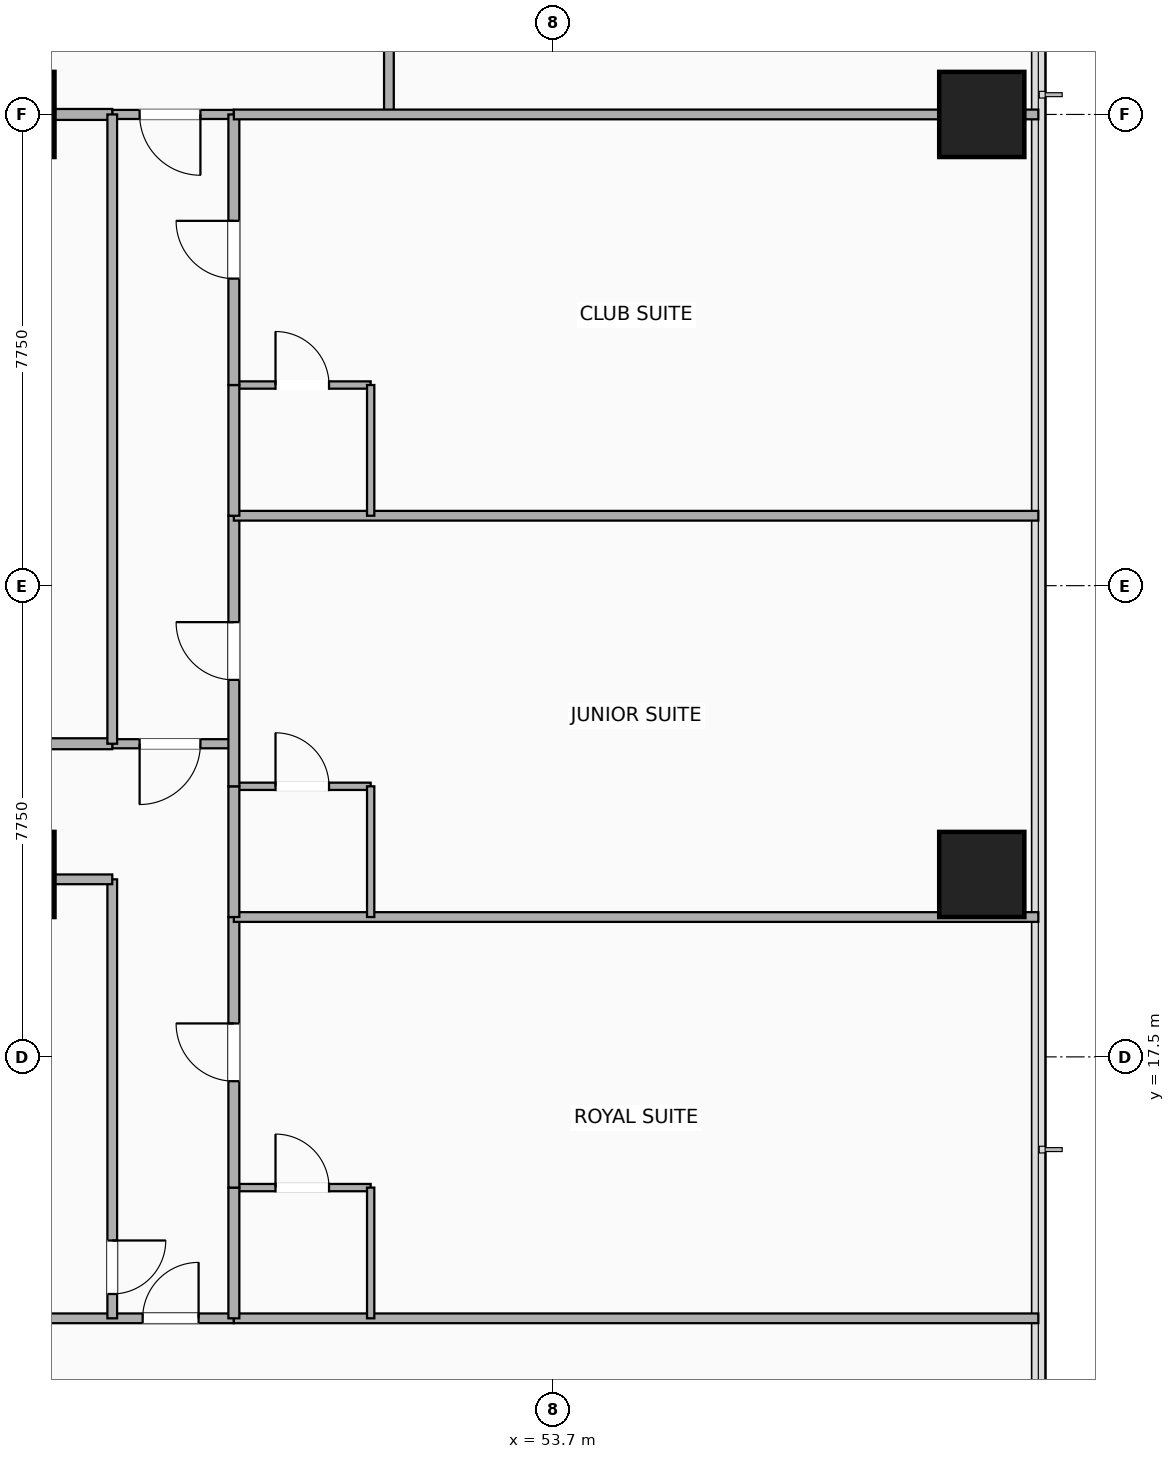
"""IFC4 building model, lengths in metres.
Left out: names, types, materials, properties, quantities, classifications, styles, units other than length and angle.
Written with IfcOpenShell. Run it as: python <this file> out.ifc"""

import sys

from ifc_helpers import new_model, si_unit, direction, frame, frame_2d, origin, origin_2d, place, context, subcontext, project, spatial, rectangle, extrude, element, fill, save


model = new_model("IFC4")
c1 = context("Model", 3, precision=1e-05, world=origin(), true_north=direction((0.0, 1.0)))
c2 = subcontext(c1, "Body", "Model", "MODEL_VIEW")
j1 = project(units=[si_unit("LENGTHUNIT", "METRE"), si_unit("PLANEANGLEUNIT", "RADIAN")], contexts=[c1])
p1 = place(None, origin())
s1 = spatial("IfcSite", under=j1, at=p1, CompositionType="ELEMENT")
p2 = place(p1, origin())
s2 = spatial("IfcBuilding", under=s1, at=p2, CompositionType="ELEMENT")
p3 = place(p2, frame((0.0, 0.0, 68.4)))
s3 = spatial("IfcBuildingStorey", under=s2, at=p3, CompositionType="ELEMENT", Elevation=68.4)
for number, where, z_axis, x_axis in (
    (1, (44.8, 20.5, -0.28), (0.0, 0.0, 1.0), (1.0, 0.0, 0.0)),
    (2, (44.8, 33.0, -0.28), (0.0, 0.0, 1.0), (1.0, 0.0, 0.0)),
    (3, (60.75, 20.5, -0.28), (0.0, 0.0, 1.0), (1.0, 0.0, 0.0)),
    (4, (60.75, 33.0, -0.28), (0.0, 0.0, 1.0), (1.0, 0.0, 0.0)),
):
    element("IfcColumn", number, at=place(p3, frame(where, z_axis=z_axis, x_axis=x_axis)), inside=s3, PredefinedType="COLUMN", context=c2, shape_type="SweptSolid", body=[
        extrude(rectangle(XDim=1.4, YDim=1.4, at=origin_2d()), origin(), (0.0, 0.0, 1.0), 3.5),
    ])
p4 = place(p3, frame((44.8, 13.2, 0.0), z_axis=(0.0, 0.0, 1.0), x_axis=(1.0, 0.0, 0.0)))
e5 = element("IfcWall", 5, at=p4, inside=s3, PredefinedType="PARTITIONING", context=c2, shape_type="SweptSolid", body=[
    extrude(rectangle(XDim=3.65, YDim=0.16, at=frame_2d((1.825, 0.0))), origin(), (0.0, 0.0, 1.0), 2.51),
])
p5 = place(p4, frame((3.07, 0.0, 0.0), z_axis=(0.0, 0.0, 1.0), x_axis=(-1.0, 0.0, 0.0)))
e6 = element("IfcOpeningElement", 6, at=p5, cuts=e5, PredefinedType="OPENING", context=c2, shape_type="SweptSolid", body=[
    extrude(rectangle(XDim=0.92, YDim=2.08, at=frame_2d((0.46, 1.04))), frame((0.0, 0.09, 0.0), z_axis=(0.0, -1.0, 0.0), x_axis=(1.0, 0.0, 0.0)), (0.0, 0.0, 1.0), 0.18),
])
p6 = place(p3, frame((46.45, 13.2, 0.0), z_axis=(0.0, 0.0, 1.0), x_axis=(0.0, 1.0, 0.0)))
e7 = element("IfcWall", 7, at=p6, inside=s3, PredefinedType="PARTITIONING", context=c2, shape_type="SweptSolid", body=[
    extrude(rectangle(XDim=7.22, YDim=0.16, at=frame_2d((3.61, 0.0))), origin(), (0.0, 0.0, 1.0), 2.51),
])
p7 = place(p6, frame((0.4, 0.0, 0.0)))
e8 = element("IfcOpeningElement", 8, at=p7, cuts=e7, PredefinedType="OPENING", context=c2, shape_type="SweptSolid", body=[
    extrude(rectangle(XDim=0.88, YDim=2.08, at=frame_2d((0.44, 1.04))), frame((0.0, 0.09, 0.0), z_axis=(0.0, -1.0, 0.0), x_axis=(1.0, 0.0, 0.0)), (0.0, 0.0, 1.0), 0.18),
])
p8 = place(p3, frame((44.8, 20.42, 0.0), z_axis=(0.0, 0.0, 1.0), x_axis=(1.0, 0.0, 0.0)))
e9 = element("IfcWall", 9, at=p8, inside=s3, PredefinedType="PARTITIONING", context=c2, shape_type="SweptSolid", body=[
    extrude(rectangle(XDim=1.65, YDim=0.16, at=frame_2d((0.825, 0.0))), origin(), (0.0, 0.0, 1.0), 2.51),
])
p9 = place(p3, frame((46.45, 22.65, 0.0), z_axis=(0.0, 0.0, 1.0), x_axis=(1.0, 0.0, 0.0)))
e10 = element("IfcWall", 10, at=p9, inside=s3, PredefinedType="PARTITIONING", context=c2, shape_type="SweptSolid", body=[
    extrude(rectangle(XDim=2.0, YDim=0.15, at=frame_2d((1.0, 0.0))), origin(), (0.0, 0.0, 1.0), 3.22),
])
p10 = place(p9, frame((0.45, 0.0, 0.0)))
e11 = element("IfcOpeningElement", 11, at=p10, cuts=e10, PredefinedType="OPENING", context=c2, shape_type="SweptSolid", body=[
    extrude(rectangle(XDim=1.0, YDim=2.15, at=frame_2d((0.5, 1.075))), frame((0.0, 0.085, 0.0), z_axis=(0.0, -1.0, 0.0), x_axis=(1.0, 0.0, 0.0)), (0.0, 0.0, 1.0), 0.17),
])
p11 = place(p3, frame((46.45, 33.0, 0.0), z_axis=(0.0, 0.0, 1.0), x_axis=(1.0, 0.0, 0.0)))
e12 = element("IfcWall", 12, at=p11, inside=s3, PredefinedType="PARTITIONING", context=c2, shape_type="SweptSolid", body=[
    extrude(rectangle(XDim=2.0, YDim=0.15, at=frame_2d((1.0, 0.0))), origin(), (0.0, 0.0, 1.0), 2.51),
])
p12 = place(p11, frame((0.45, 0.0, 0.0)))
e13 = element("IfcOpeningElement", 13, at=p12, cuts=e12, PredefinedType="OPENING", context=c2, shape_type="SweptSolid", body=[
    extrude(rectangle(XDim=1.0, YDim=2.15, at=frame_2d((0.5, 1.075))), frame((0.0, 0.085, 0.0), z_axis=(0.0, -1.0, 0.0), x_axis=(1.0, 0.0, 0.0)), (0.0, 0.0, 1.0), 0.17),
])
p13 = place(p3, frame((51.0, 33.0, 0.0), z_axis=(0.0, 0.0, 1.0), x_axis=(0.0, 1.0, 0.0)))
e14 = element("IfcWall", 14, at=p13, inside=s3, PredefinedType="PARTITIONING", context=c2, shape_type="SweptSolid", body=[
    extrude(rectangle(XDim=2.05, YDim=0.16, at=frame_2d((1.025, 0.0))), origin(), (0.0, 0.0, 1.0), 2.51),
])
p14 = place(p3, frame((24.1, 22.65, 0.0), z_axis=(0.0, 0.0, 1.0), x_axis=(1.0, 0.0, 0.0)))
e15 = element("IfcWall", 15, at=p14, inside=s3, PredefinedType="PARTITIONING", context=c2, shape_type="SweptSolid", body=[
    extrude(rectangle(XDim=22.35, YDim=0.18, at=frame_2d((11.175, 0.0))), origin(), (0.0, 0.0, 1.0), 2.51),
])
p15 = place(p14, frame((10.7, 0.0, 0.0)))
e16 = element("IfcOpeningElement", 16, at=p15, cuts=e15, PredefinedType="OPENING", context=c2, shape_type="SweptSolid", body=[
    extrude(rectangle(XDim=0.95, YDim=2.15, at=frame_2d((0.475, 1.075))), frame((0.0, 0.1, 0.0), z_axis=(0.0, -1.0, 0.0), x_axis=(1.0, 0.0, 0.0)), (0.0, 0.0, 1.0), 0.2),
])
p16 = place(p3, frame((24.1, 33.0, 0.0), z_axis=(0.0, 0.0, 1.0), x_axis=(1.0, 0.0, 0.0)))
e17 = element("IfcWall", 17, at=p16, inside=s3, PredefinedType="PARTITIONING", context=c2, shape_type="SweptSolid", body=[
    extrude(rectangle(XDim=22.35, YDim=0.18, at=frame_2d((11.175, 0.0))), origin(), (0.0, 0.0, 1.0), 2.51),
])
p17 = place(p3, frame((46.45, 22.65, 0.0), z_axis=(0.0, 0.0, 1.0), x_axis=(0.0, 1.0, 0.0)))
e18 = element("IfcWall", 18, at=p17, inside=s3, PredefinedType="PARTITIONING", context=c2, shape_type="SweptSolid", body=[
    extrude(rectangle(XDim=10.35, YDim=0.16, at=frame_2d((5.175, 0.0))), origin(), (0.0, 0.0, 1.0), 2.51),
])
p18 = place(p3, frame((48.45, 13.2, 0.0), z_axis=(0.0, 0.0, 1.0), x_axis=(1.0, 0.0, 0.0)))
e19 = element("IfcWall", 19, at=p18, inside=s3, PredefinedType="PARTITIONING", context=c2, shape_type="SweptSolid", body=[
    extrude(rectangle(XDim=13.23, YDim=0.16, at=frame_2d((6.615, 0.0))), origin(), (0.0, 0.0, 1.0), 2.583),
])
p19 = place(p3, frame((48.45, 15.35, 0.0), z_axis=(0.0, 0.0, 1.0), x_axis=(1.0, 0.0, 0.0)))
e20 = element("IfcWall", 20, at=p19, inside=s3, PredefinedType="PARTITIONING", context=c2, shape_type="SweptSolid", body=[
    extrude(rectangle(XDim=2.25, YDim=0.12, at=frame_2d((1.125, 0.0))), origin(), (0.0, 0.0, 1.0), 3.22),
])
p20 = place(p19, frame((1.565, 0.0, 0.0), z_axis=(0.0, 0.0, 1.0), x_axis=(-1.0, 0.0, 0.0)))
e21 = element("IfcOpeningElement", 21, at=p20, cuts=e20, PredefinedType="OPENING", context=c2, shape_type="SweptSolid", body=[
    extrude(rectangle(XDim=0.88, YDim=2.08, at=frame_2d((0.44, 1.04))), frame((0.0, 0.07, 0.0), z_axis=(0.0, -1.0, 0.0), x_axis=(1.0, 0.0, 0.0)), (0.0, 0.0, 1.0), 0.14),
])
p21 = place(p3, frame((50.7, 13.2, 0.0), z_axis=(0.0, 0.0, 1.0), x_axis=(0.0, 1.0, 0.0)))
e22 = element("IfcWall", 22, at=p21, inside=s3, PredefinedType="PARTITIONING", context=c2, shape_type="SweptSolid", body=[
    extrude(rectangle(XDim=2.15, YDim=0.12, at=frame_2d((1.075, 0.0))), origin(), (0.0, 0.0, 1.0), 2.902),
])
p22 = place(p3, frame((48.45, 13.2, 0.0), z_axis=(0.0, 0.0, 1.0), x_axis=(0.0, 1.0, 0.0)))
e23 = element("IfcWall", 23, at=p22, inside=s3, PredefinedType="PARTITIONING", context=c2, shape_type="SweptSolid", body=[
    extrude(rectangle(XDim=2.15, YDim=0.18, at=frame_2d((1.075, 0.0))), origin(), (0.0, 0.0, 1.0), 2.902),
])
p23 = place(p3, frame((48.45, 15.35, 0.0), z_axis=(0.0, 0.0, 1.0), x_axis=(0.0, 1.0, 0.0)))
e24 = element("IfcWall", 24, at=p23, inside=s3, PredefinedType="PARTITIONING", context=c2, shape_type="SweptSolid", body=[
    extrude(rectangle(XDim=4.45, YDim=0.18, at=frame_2d((2.225, 0.0))), origin(), (0.0, 0.0, 1.0), 2.902),
])
p24 = place(p23, frame((2.7, 0.0, 0.0), z_axis=(0.0, 0.0, 1.0), x_axis=(-1.0, 0.0, 0.0)))
e25 = element("IfcOpeningElement", 25, at=p24, cuts=e24, PredefinedType="OPENING", context=c2, shape_type="SweptSolid", body=[
    extrude(rectangle(XDim=0.95, YDim=2.15, at=frame_2d((0.475, 1.075))), frame((0.0, 0.1, 0.0), z_axis=(0.0, -1.0, 0.0), x_axis=(1.0, 0.0, 0.0)), (0.0, 0.0, 1.0), 0.2),
])
p25 = place(p3, frame((48.45, 19.8, 0.0), z_axis=(0.0, 0.0, 1.0), x_axis=(1.0, 0.0, 0.0)))
e26 = element("IfcWall", 26, at=p25, inside=s3, PredefinedType="PARTITIONING", context=c2, shape_type="SweptSolid", body=[
    extrude(rectangle(XDim=13.23, YDim=0.16, at=frame_2d((6.615, 0.0))), origin(), (0.0, 0.0, 1.0), 2.583),
])
p26 = place(p3, frame((48.45, 21.95, 0.0), z_axis=(0.0, 0.0, 1.0), x_axis=(1.0, 0.0, 0.0)))
e27 = element("IfcWall", 27, at=p26, inside=s3, PredefinedType="PARTITIONING", context=c2, shape_type="SweptSolid", body=[
    extrude(rectangle(XDim=2.25, YDim=0.12, at=frame_2d((1.125, 0.0))), origin(), (0.0, 0.0, 1.0), 3.22),
])
p27 = place(p26, frame((1.565, 0.0, 0.0), z_axis=(0.0, 0.0, 1.0), x_axis=(-1.0, 0.0, 0.0)))
e28 = element("IfcOpeningElement", 28, at=p27, cuts=e27, PredefinedType="OPENING", context=c2, shape_type="SweptSolid", body=[
    extrude(rectangle(XDim=0.88, YDim=2.08, at=frame_2d((0.44, 1.04))), frame((0.0, 0.07, 0.0), z_axis=(0.0, -1.0, 0.0), x_axis=(1.0, 0.0, 0.0)), (0.0, 0.0, 1.0), 0.14),
])
p28 = place(p3, frame((50.7, 19.8, 0.0), z_axis=(0.0, 0.0, 1.0), x_axis=(0.0, 1.0, 0.0)))
e29 = element("IfcWall", 29, at=p28, inside=s3, PredefinedType="PARTITIONING", context=c2, shape_type="SweptSolid", body=[
    extrude(rectangle(XDim=2.15, YDim=0.12, at=frame_2d((1.075, 0.0))), origin(), (0.0, 0.0, 1.0), 2.51),
])
p29 = place(p3, frame((48.45, 19.8, 0.0), z_axis=(0.0, 0.0, 1.0), x_axis=(0.0, 1.0, 0.0)))
e30 = element("IfcWall", 30, at=p29, inside=s3, PredefinedType="PARTITIONING", context=c2, shape_type="SweptSolid", body=[
    extrude(rectangle(XDim=2.15, YDim=0.18, at=frame_2d((1.075, 0.0))), origin(), (0.0, 0.0, 1.0), 2.51),
])
p30 = place(p3, frame((48.45, 21.95, 0.0), z_axis=(0.0, 0.0, 1.0), x_axis=(0.0, 1.0, 0.0)))
e31 = element("IfcWall", 31, at=p30, inside=s3, PredefinedType="PARTITIONING", context=c2, shape_type="SweptSolid", body=[
    extrude(rectangle(XDim=4.45, YDim=0.18, at=frame_2d((2.225, 0.0))), origin(), (0.0, 0.0, 1.0), 2.788),
])
p31 = place(p30, frame((2.7, 0.0, 0.0), z_axis=(0.0, 0.0, 1.0), x_axis=(-1.0, 0.0, 0.0)))
e32 = element("IfcOpeningElement", 32, at=p31, cuts=e31, PredefinedType="OPENING", context=c2, shape_type="SweptSolid", body=[
    extrude(rectangle(XDim=0.95, YDim=2.15, at=frame_2d((0.475, 1.075))), frame((0.0, 0.1, 0.0), z_axis=(0.0, -1.0, 0.0), x_axis=(1.0, 0.0, 0.0)), (0.0, 0.0, 1.0), 0.2),
])
p32 = place(p3, frame((48.45, 26.4, 0.0), z_axis=(0.0, 0.0, 1.0), x_axis=(1.0, 0.0, 0.0)))
e33 = element("IfcWall", 33, at=p32, inside=s3, PredefinedType="PARTITIONING", context=c2, shape_type="SweptSolid", body=[
    extrude(rectangle(XDim=13.23, YDim=0.16, at=frame_2d((6.615, 0.0))), origin(), (0.0, 0.0, 1.0), 2.583),
])
p33 = place(p3, frame((48.45, 28.55, 0.0), z_axis=(0.0, 0.0, 1.0), x_axis=(1.0, 0.0, 0.0)))
e34 = element("IfcWall", 34, at=p33, inside=s3, PredefinedType="PARTITIONING", context=c2, shape_type="SweptSolid", body=[
    extrude(rectangle(XDim=2.25, YDim=0.12, at=frame_2d((1.125, 0.0))), origin(), (0.0, 0.0, 1.0), 3.22),
])
p34 = place(p33, frame((1.565, 0.0, 0.0), z_axis=(0.0, 0.0, 1.0), x_axis=(-1.0, 0.0, 0.0)))
e35 = element("IfcOpeningElement", 35, at=p34, cuts=e34, PredefinedType="OPENING", context=c2, shape_type="SweptSolid", body=[
    extrude(rectangle(XDim=0.88, YDim=2.08, at=frame_2d((0.44, 1.04))), frame((0.0, 0.07, 0.0), z_axis=(0.0, -1.0, 0.0), x_axis=(1.0, 0.0, 0.0)), (0.0, 0.0, 1.0), 0.14),
])
p35 = place(p3, frame((50.7, 26.4, 0.0), z_axis=(0.0, 0.0, 1.0), x_axis=(0.0, 1.0, 0.0)))
e36 = element("IfcWall", 36, at=p35, inside=s3, PredefinedType="PARTITIONING", context=c2, shape_type="SweptSolid", body=[
    extrude(rectangle(XDim=2.15, YDim=0.12, at=frame_2d((1.075, 0.0))), origin(), (0.0, 0.0, 1.0), 3.22),
])
p36 = place(p3, frame((48.45, 26.4, 0.0), z_axis=(0.0, 0.0, 1.0), x_axis=(0.0, 1.0, 0.0)))
e37 = element("IfcWall", 37, at=p36, inside=s3, PredefinedType="PARTITIONING", context=c2, shape_type="SweptSolid", body=[
    extrude(rectangle(XDim=2.15, YDim=0.18, at=frame_2d((1.075, 0.0))), origin(), (0.0, 0.0, 1.0), 3.22),
])
p37 = place(p3, frame((48.45, 28.55, 0.0), z_axis=(0.0, 0.0, 1.0), x_axis=(0.0, 1.0, 0.0)))
e38 = element("IfcWall", 38, at=p37, inside=s3, PredefinedType="PARTITIONING", context=c2, shape_type="SweptSolid", body=[
    extrude(rectangle(XDim=4.45, YDim=0.18, at=frame_2d((2.225, 0.0))), origin(), (0.0, 0.0, 1.0), 2.51),
])
p38 = place(p37, frame((2.7, 0.0, 0.0), z_axis=(0.0, 0.0, 1.0), x_axis=(-1.0, 0.0, 0.0)))
e39 = element("IfcOpeningElement", 39, at=p38, cuts=e38, PredefinedType="OPENING", context=c2, shape_type="SweptSolid", body=[
    extrude(rectangle(XDim=0.95, YDim=2.15, at=frame_2d((0.475, 1.075))), frame((0.0, 0.1, 0.0), z_axis=(0.0, -1.0, 0.0), x_axis=(1.0, 0.0, 0.0)), (0.0, 0.0, 1.0), 0.2),
])
p39 = place(p3, frame((48.45, 33.0, 0.0), z_axis=(0.0, 0.0, 1.0), x_axis=(1.0, 0.0, 0.0)))
e40 = element("IfcWall", 40, at=p39, inside=s3, PredefinedType="PARTITIONING", context=c2, shape_type="SweptSolid", body=[
    extrude(rectangle(XDim=13.23, YDim=0.16, at=frame_2d((6.615, 0.0))), origin(), (0.0, 0.0, 1.0), 2.51),
])
p40 = place(p5, origin())
e41 = element("IfcDoor", 41, at=p40, inside=s3, OperationType="SINGLE_SWING_RIGHT", PredefinedType="DOOR", context=c2, shape_type="SweptSolid", body=[
    extrude(rectangle(XDim=0.92, YDim=2.08, at=frame_2d((0.46, 1.04))), frame((0.0, 0.025, 0.0), z_axis=(0.0, -1.0, 0.0), x_axis=(1.0, 0.0, 0.0)), (0.0, 0.0, 1.0), 0.05),
])
fill(e6, e41)
p41 = place(p7, origin())
e42 = element("IfcDoor", 42, at=p41, inside=s3, OperationType="SINGLE_SWING_RIGHT", PredefinedType="DOOR", context=c2, shape_type="SweptSolid", body=[
    extrude(rectangle(XDim=0.88, YDim=2.08, at=frame_2d((0.44, 1.04))), frame((0.0, 0.025, 0.0), z_axis=(0.0, -1.0, 0.0), x_axis=(1.0, 0.0, 0.0)), (0.0, 0.0, 1.0), 0.05),
])
fill(e8, e42)
p42 = place(p10, origin())
e43 = element("IfcDoor", 43, at=p42, inside=s3, OperationType="SINGLE_SWING_LEFT", PredefinedType="DOOR", context=c2, shape_type="SweptSolid", body=[
    extrude(rectangle(XDim=1.0, YDim=2.15, at=frame_2d((0.5, 1.075))), frame((0.0, 0.025, 0.0), z_axis=(0.0, -1.0, 0.0), x_axis=(1.0, 0.0, 0.0)), (0.0, 0.0, 1.0), 0.05),
])
fill(e11, e43)
p43 = place(p12, origin())
e44 = element("IfcDoor", 44, at=p43, inside=s3, OperationType="SINGLE_SWING_RIGHT", PredefinedType="DOOR", context=c2, shape_type="SweptSolid", body=[
    extrude(rectangle(XDim=1.0, YDim=2.15, at=frame_2d((0.5, 1.075))), frame((0.0, 0.025, 0.0), z_axis=(0.0, -1.0, 0.0), x_axis=(1.0, 0.0, 0.0)), (0.0, 0.0, 1.0), 0.05),
])
fill(e13, e44)
p44 = place(p20, origin())
e45 = element("IfcDoor", 45, at=p44, inside=s3, OperationType="SINGLE_SWING_LEFT", PredefinedType="DOOR", context=c2, shape_type="SweptSolid", body=[
    extrude(rectangle(XDim=0.88, YDim=2.08, at=frame_2d((0.44, 1.04))), frame((0.0, 0.025, 0.0), z_axis=(0.0, -1.0, 0.0), x_axis=(1.0, 0.0, 0.0)), (0.0, 0.0, 1.0), 0.05),
])
fill(e21, e45)
p45 = place(p24, origin())
e46 = element("IfcDoor", 46, at=p45, inside=s3, OperationType="SINGLE_SWING_RIGHT", PredefinedType="DOOR", context=c2, shape_type="SweptSolid", body=[
    extrude(rectangle(XDim=0.95, YDim=2.15, at=frame_2d((0.475, 1.075))), frame((0.0, 0.025, 0.0), z_axis=(0.0, -1.0, 0.0), x_axis=(1.0, 0.0, 0.0)), (0.0, 0.0, 1.0), 0.05),
])
fill(e25, e46)
p46 = place(p27, origin())
e47 = element("IfcDoor", 47, at=p46, inside=s3, OperationType="SINGLE_SWING_LEFT", PredefinedType="DOOR", context=c2, shape_type="SweptSolid", body=[
    extrude(rectangle(XDim=0.88, YDim=2.08, at=frame_2d((0.44, 1.04))), frame((0.0, 0.025, 0.0), z_axis=(0.0, -1.0, 0.0), x_axis=(1.0, 0.0, 0.0)), (0.0, 0.0, 1.0), 0.05),
])
fill(e28, e47)
p47 = place(p31, origin())
e48 = element("IfcDoor", 48, at=p47, inside=s3, OperationType="SINGLE_SWING_RIGHT", PredefinedType="DOOR", context=c2, shape_type="SweptSolid", body=[
    extrude(rectangle(XDim=0.95, YDim=2.15, at=frame_2d((0.475, 1.075))), frame((0.0, 0.025, 0.0), z_axis=(0.0, -1.0, 0.0), x_axis=(1.0, 0.0, 0.0)), (0.0, 0.0, 1.0), 0.05),
])
fill(e32, e48)
p48 = place(p34, origin())
e49 = element("IfcDoor", 49, at=p48, inside=s3, OperationType="SINGLE_SWING_LEFT", PredefinedType="DOOR", context=c2, shape_type="SweptSolid", body=[
    extrude(rectangle(XDim=0.88, YDim=2.08, at=frame_2d((0.44, 1.04))), frame((0.0, 0.025, 0.0), z_axis=(0.0, -1.0, 0.0), x_axis=(1.0, 0.0, 0.0)), (0.0, 0.0, 1.0), 0.05),
])
fill(e35, e49)
p49 = place(p38, origin())
e50 = element("IfcDoor", 50, at=p49, inside=s3, OperationType="SINGLE_SWING_RIGHT", PredefinedType="DOOR", context=c2, shape_type="SweptSolid", body=[
    extrude(rectangle(XDim=0.95, YDim=2.15, at=frame_2d((0.475, 1.075))), frame((0.0, 0.025, 0.0), z_axis=(0.0, -1.0, 0.0), x_axis=(1.0, 0.0, 0.0)), (0.0, 0.0, 1.0), 0.05),
])
fill(e39, e50)
save(model, sys.argv[1])
